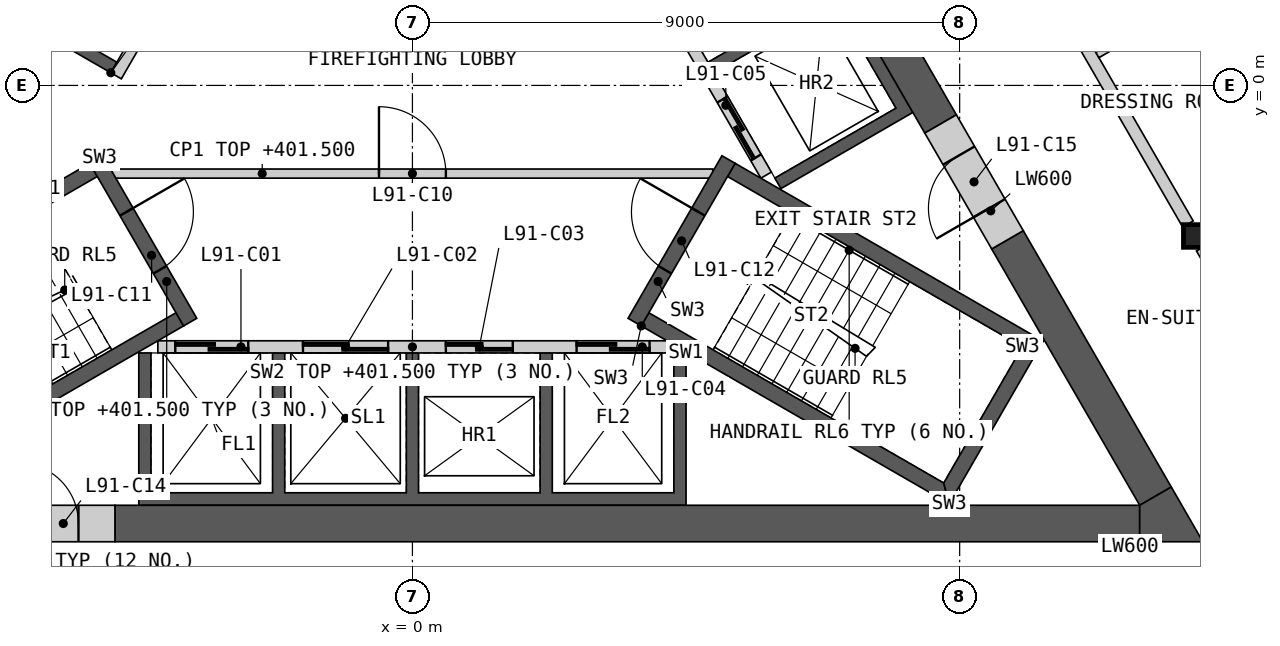
"""IFC4 building model, lengths in metres.
Left out: names, types, materials, properties, quantities, classifications, styles, units other than length and angle.
Written with IfcOpenShell. Run it as: python <this file> out.ifc"""

import sys

from ifc_helpers import new_model, si_unit, direction, frame, frame_2d, origin, origin_2d, place, context, subcontext, project, spatial, polyline, rectangle, i_section, outline, extrude, element, fill, save


model = new_model("IFC4")
c1 = context("Model", 3, precision=1e-05, world=origin(), true_north=direction((0.0, 1.0)))
c2 = subcontext(c1, "Body", "Model", "MODEL_VIEW")
j1 = project(units=[si_unit("LENGTHUNIT", "METRE"), si_unit("PLANEANGLEUNIT", "RADIAN")], contexts=[c1])
p1 = place(None, origin())
s1 = spatial("IfcSite", under=j1, at=p1, CompositionType="ELEMENT")
p2 = place(p1, origin())
s2 = spatial("IfcBuilding", under=s1, at=p2, CompositionType="ELEMENT")
p3 = place(p2, frame((0.0, 0.0, 398.4)))
s3 = spatial("IfcBuildingStorey", under=s2, at=p3, CompositionType="ELEMENT", Elevation=398.4)
p4 = place(p3, frame((12.868, -2.476, 0.0), z_axis=(0.0, 0.0, 1.0), x_axis=(1.0, 0.0, 0.0)))
e1 = element("IfcColumn", 1, at=p4, inside=s3, PredefinedType="COLUMN", context=c2, shape_type="SweptSolid", body=[
    extrude(i_section(OverallWidth=0.374, OverallDepth=0.372, WebThickness=0.016, FlangeThickness=0.026, at=origin_2d()), origin(), (0.0, 0.0, 1.0), 3.4),
])
p5 = place(p3, origin())
e2 = element("IfcWall", 2, at=p5, inside=s3, PredefinedType="SHEAR", context=c2, shape_type="SweptSolid", body=[
    extrude(outline(polyline([(4.5, -4.4), (4.5, -6.906), (-4.5, -6.906), (-4.5, -4.4), (-4.3, -4.4), (-4.3, -6.7), (-2.3, -6.7), (-2.3, -4.4), (-2.1, -4.4), (-2.1, -6.7), (-0.1, -6.7), (-0.1, -4.4), (0.1, -4.4), (0.1, -6.7), (2.1, -6.7), (2.1, -4.4), (2.3, -4.4), (2.3, -6.7), (4.3, -6.7), (4.3, -4.4), (4.5, -4.4)])), origin(), (0.0, 0.0, 1.0), 3.1),
])
p6 = place(p3, frame((-4.187, -4.3, 0.0), z_axis=(0.0, 0.0, 1.0), x_axis=(1.0, 0.0, 0.0)))
e3 = element("IfcWall", 3, at=p6, inside=s3, PredefinedType="SOLIDWALL", context=c2, shape_type="SweptSolid", body=[
    extrude(rectangle(XDim=8.373, YDim=0.2, at=frame_2d((4.187, 0.0))), origin(), (0.0, 0.0, 1.0), 3.1),
])
p7 = place(p6, frame((0.287, 0.0, 0.0)))
e4 = element("IfcOpeningElement", 4, at=p7, cuts=e3, PredefinedType="OPENING", context=c2, shape_type="SweptSolid", body=[
    extrude(rectangle(XDim=1.2, YDim=2.1, at=frame_2d((0.6, 1.05))), frame((0.0, 0.11, 0.0), z_axis=(0.0, -1.0, 0.0), x_axis=(1.0, 0.0, 0.0)), (0.0, 0.0, 1.0), 0.22),
])
p8 = place(p6, frame((2.387, 0.0, 0.0)))
e5 = element("IfcOpeningElement", 5, at=p8, cuts=e3, PredefinedType="OPENING", context=c2, shape_type="SweptSolid", body=[
    extrude(rectangle(XDim=1.4, YDim=2.1, at=frame_2d((0.7, 1.05))), frame((0.0, 0.11, 0.0), z_axis=(0.0, -1.0, 0.0), x_axis=(1.0, 0.0, 0.0)), (0.0, 0.0, 1.0), 0.22),
])
p9 = place(p6, frame((4.737, 0.0, 0.0)))
e6 = element("IfcOpeningElement", 6, at=p9, cuts=e3, PredefinedType="OPENING", context=c2, shape_type="SweptSolid", body=[
    extrude(rectangle(XDim=1.1, YDim=2.1, at=frame_2d((0.55, 1.05))), frame((0.0, 0.11, 0.0), z_axis=(0.0, -1.0, 0.0), x_axis=(1.0, 0.0, 0.0)), (0.0, 0.0, 1.0), 0.22),
])
p10 = place(p6, frame((6.887, 0.0, 0.0)))
e7 = element("IfcOpeningElement", 7, at=p10, cuts=e3, PredefinedType="OPENING", context=c2, shape_type="SweptSolid", body=[
    extrude(rectangle(XDim=1.2, YDim=2.1, at=frame_2d((0.6, 1.05))), frame((0.0, 0.11, 0.0), z_axis=(0.0, -1.0, 0.0), x_axis=(1.0, 0.0, 0.0)), (0.0, 0.0, 1.0), 0.22),
])
p11 = place(p3, origin())
e8 = element("IfcWall", 8, at=p11, inside=s3, PredefinedType="SHEAR", context=c2, shape_type="SweptSolid", body=[
    extrude(outline(polyline([(1.561, 6.097), (3.731, 7.35), (8.231, -0.444), (6.061, -1.697), (5.96, -1.524), (7.952, -0.374), (6.952, 1.358), (4.96, 0.208), (4.861, 0.381), (6.852, 1.531), (5.852, 3.263), (3.861, 2.113), (3.76, 2.287), (5.752, 3.437), (4.752, 5.169), (2.76, 4.019), (2.66, 4.192), (4.652, 5.342), (3.652, 7.074), (1.66, 5.924), (1.561, 6.097)])), origin(), (0.0, 0.0, 1.0), 3.1),
])
p12 = place(p3, frame((5.817, -1.476, 0.0), z_axis=(0.0, 0.0, 1.0), x_axis=(-0.500002616675, 0.866023893041, 0.0)))
e9 = element("IfcWall", 9, at=p12, inside=s3, PredefinedType="SOLIDWALL", context=c2, shape_type="SweptSolid", body=[
    extrude(rectangle(XDim=8.373, YDim=0.2, at=frame_2d((4.187, 0.0))), origin(), (0.0, 0.0, 1.0), 3.1),
])
p13 = place(p12, frame((0.337, 0.0, 0.0)))
e10 = element("IfcOpeningElement", 10, at=p13, cuts=e9, PredefinedType="OPENING", context=c2, shape_type="SweptSolid", body=[
    extrude(rectangle(XDim=1.1, YDim=2.1, at=frame_2d((0.55, 1.05))), frame((0.0, 0.11, 0.0), z_axis=(0.0, -1.0, 0.0), x_axis=(1.0, 0.0, 0.0)), (0.0, 0.0, 1.0), 0.22),
])
p14 = place(p12, frame((2.537, 0.0, 0.0)))
e11 = element("IfcOpeningElement", 11, at=p14, cuts=e9, PredefinedType="OPENING", context=c2, shape_type="SweptSolid", body=[
    extrude(rectangle(XDim=1.1, YDim=2.1, at=frame_2d((0.55, 1.05))), frame((0.0, 0.11, 0.0), z_axis=(0.0, -1.0, 0.0), x_axis=(1.0, 0.0, 0.0)), (0.0, 0.0, 1.0), 0.22),
])
p15 = place(p12, frame((4.737, 0.0, 0.0)))
e12 = element("IfcOpeningElement", 12, at=p15, cuts=e9, PredefinedType="OPENING", context=c2, shape_type="SweptSolid", body=[
    extrude(rectangle(XDim=1.1, YDim=2.1, at=frame_2d((0.55, 1.05))), frame((0.0, 0.11, 0.0), z_axis=(0.0, -1.0, 0.0), x_axis=(1.0, 0.0, 0.0)), (0.0, 0.0, 1.0), 0.22),
])
p16 = place(p12, frame((7.037, 0.0, 0.0)))
e13 = element("IfcOpeningElement", 13, at=p16, cuts=e9, PredefinedType="OPENING", context=c2, shape_type="SweptSolid", body=[
    extrude(rectangle(XDim=0.9, YDim=2.1, at=frame_2d((0.45, 1.05))), frame((0.0, 0.11, 0.0), z_axis=(0.0, -1.0, 0.0), x_axis=(1.0, 0.0, 0.0)), (0.0, 0.0, 1.0), 0.22),
])
p17 = place(p3, origin())
e14 = element("IfcWall", 14, at=p17, inside=s3, PredefinedType="SHEAR", context=c2, shape_type="SweptSolid", body=[
    extrude(outline(polyline([(-4.96, 0.208), (-7.131, 1.461), (-3.731, 7.35), (-1.561, 6.097), (-1.66, 5.924), (-3.652, 7.074), (-6.852, 1.531), (-4.861, 0.381), (-4.96, 0.208)])), origin(), (0.0, 0.0, 1.0), 3.1),
])
p18 = place(p3, frame((-1.631, 5.776, 0.0), z_axis=(0.0, 0.0, 1.0), x_axis=(-0.499992876559, -0.866029516466, 0.0)))
e15 = element("IfcWall", 15, at=p18, inside=s3, PredefinedType="SOLIDWALL", context=c2, shape_type="SweptSolid", body=[
    extrude(rectangle(XDim=6.486, YDim=0.2, at=frame_2d((3.243, 0.0))), origin(), (0.0, 0.0, 1.0), 3.1),
])
p19 = place(p18, frame((2.637, 0.0, 0.0)))
e16 = element("IfcOpeningElement", 16, at=p19, cuts=e15, PredefinedType="OPENING", context=c2, shape_type="SweptSolid", body=[
    extrude(rectangle(XDim=0.9, YDim=2.1, at=frame_2d((0.45, 1.05))), frame((0.0, 0.11, 0.0), z_axis=(0.0, -1.0, 0.0), x_axis=(1.0, 0.0, 0.0)), (0.0, 0.0, 1.0), 0.22),
])
p20 = place(p3, frame((-4.941, -1.45, 0.0), z_axis=(0.0, 0.0, 1.0), x_axis=(1.0, 0.0, 0.0)))
e17 = element("IfcWall", 17, at=p20, inside=s3, PredefinedType="PARTITIONING", context=c2, shape_type="SweptSolid", body=[
    extrude(rectangle(XDim=9.882, YDim=0.15, at=frame_2d((4.941, 0.0))), origin(), (0.0, 0.0, 1.0), 3.1),
])
p21 = place(p20, frame((4.391, 0.0, 0.0)))
e18 = element("IfcOpeningElement", 18, at=p21, cuts=e17, PredefinedType="OPENING", context=c2, shape_type="SweptSolid", body=[
    extrude(rectangle(XDim=1.1, YDim=2.1, at=frame_2d((0.55, 1.05))), frame((0.0, 0.085, 0.0), z_axis=(0.0, -1.0, 0.0), x_axis=(1.0, 0.0, 0.0)), (0.0, 0.0, 1.0), 0.17),
])
p22 = place(p3, origin())
e19 = element("IfcWall", 19, at=p22, inside=s3, PredefinedType="SHEAR", context=c2, shape_type="SweptSolid", body=[
    extrude(outline(polyline([(-5.307, -1.281), (-10.374, -4.206), (-10.032, -4.298), (-5.182, -1.498), (-5.307, -1.281)])), origin(), (0.0, 0.0, 1.0), 3.1),
])
p23 = place(p3, origin())
e20 = element("IfcWall", 20, at=p23, inside=s3, PredefinedType="SHEAR", context=c2, shape_type="SweptSolid", body=[
    extrude(outline(polyline([(-8.738, -6.539), (-8.83, -6.881), (-3.763, -3.956), (-3.888, -3.739), (-8.738, -6.539)])), origin(), (0.0, 0.0, 1.0), 3.1),
])
p24 = place(p3, frame((-5.199, -1.219, 0.0), z_axis=(0.0, 0.0, 1.0), x_axis=(0.499982516597, -0.866035497597, 0.0)))
e21 = element("IfcWall", 21, at=p24, inside=s3, PredefinedType="SHEAR", context=c2, shape_type="SweptSolid", body=[
    extrude(rectangle(XDim=3.088, YDim=0.25, at=frame_2d((1.544, 0.0))), origin(), (0.0, 0.0, 1.0), 3.1),
])
p25 = place(p24, frame((0.994, 0.0, 0.0)))
e22 = element("IfcOpeningElement", 22, at=p25, cuts=e21, PredefinedType="OPENING", context=c2, shape_type="SweptSolid", body=[
    extrude(rectangle(XDim=1.1, YDim=2.1, at=frame_2d((0.55, 1.05))), frame((0.0, 0.135, 0.0), z_axis=(0.0, -1.0, 0.0), x_axis=(1.0, 0.0, 0.0)), (0.0, 0.0, 1.0), 0.27),
])
p26 = place(p3, origin())
e23 = element("IfcWall", 23, at=p26, inside=s3, PredefinedType="SHEAR", context=c2, shape_type="SweptSolid", body=[
    extrude(outline(polyline([(3.763, -3.956), (8.83, -6.881), (8.738, -6.539), (3.888, -3.739), (3.763, -3.956)])), origin(), (0.0, 0.0, 1.0), 3.1),
])
p27 = place(p3, origin())
e24 = element("IfcWall", 24, at=p27, inside=s3, PredefinedType="SHEAR", context=c2, shape_type="SweptSolid", body=[
    extrude(outline(polyline([(8.83, -6.881), (10.374, -4.206), (10.032, -4.298), (8.738, -6.539), (8.83, -6.881)])), origin(), (0.0, 0.0, 1.0), 3.1),
])
p28 = place(p3, origin())
e25 = element("IfcWall", 25, at=p28, inside=s3, PredefinedType="SHEAR", context=c2, shape_type="SweptSolid", body=[
    extrude(outline(polyline([(10.032, -4.298), (10.374, -4.206), (5.307, -1.281), (5.182, -1.498), (10.032, -4.298)])), origin(), (0.0, 0.0, 1.0), 3.1),
])
p29 = place(p3, frame((3.655, -3.893, 0.0), z_axis=(0.0, 0.0, 1.0), x_axis=(0.499982516597, 0.866035497597, 0.0)))
e26 = element("IfcWall", 26, at=p29, inside=s3, PredefinedType="SHEAR", context=c2, shape_type="SweptSolid", body=[
    extrude(rectangle(XDim=3.088, YDim=0.25, at=frame_2d((1.544, 0.0))), origin(), (0.0, 0.0, 1.0), 3.1),
])
p30 = place(p29, frame((0.994, 0.0, 0.0)))
e27 = element("IfcOpeningElement", 27, at=p30, cuts=e26, PredefinedType="OPENING", context=c2, shape_type="SweptSolid", body=[
    extrude(rectangle(XDim=1.1, YDim=2.1, at=frame_2d((0.55, 1.05))), frame((0.0, 0.135, 0.0), z_axis=(0.0, -1.0, 0.0), x_axis=(1.0, 0.0, 0.0)), (0.0, 0.0, 1.0), 0.27),
])
for number, where, z_axis, x_axis in (
    (28, (-4.892, -7.206, 0.0), (0.0, 0.0, 1.0), (1.0, 0.0, 0.0)),
    (29, (8.686, -0.634, 0.0), (0.0, 0.0, 1.0), (-0.5, 0.866, 0.0)),
):
    element("IfcWall", number, at=place(p3, frame(where, z_axis=z_axis, x_axis=x_axis)), inside=s3, PredefinedType="SHEAR", context=c2, shape_type="SweptSolid", body=[
        extrude(rectangle(XDim=16.853, YDim=0.6, at=frame_2d((8.426, 0.0))), origin(), (0.0, 0.0, 1.0), 3.1),
    ])
p31 = place(p3, frame((12.221, -6.756, 0.0), z_axis=(0.0, 0.0, 1.0), x_axis=(-0.50000604952, 0.866021911064, 0.0)))
e30 = element("IfcWall", 30, at=p31, inside=s3, PredefinedType="SHEAR", context=c2, shape_type="SweptSolid", body=[
    extrude(rectangle(XDim=4.869, YDim=0.6, at=frame_2d((2.434, 0.0))), origin(), (0.0, 0.0, 1.0), 3.1),
])
p32 = place(p3, origin())
e31 = element("IfcWall", 31, at=p32, inside=s3, PredefinedType="SHEAR", context=c2, shape_type="SweptSolid", body=[
    extrude(outline(polyline([(11.961, -7.506), (11.961, -6.906), (12.48, -6.606), (13.0, -7.506), (11.961, -7.506)])), origin(), (0.0, 0.0, 1.0), 3.1),
])
p33 = place(p3, frame((-7.092, -7.206, 0.0), z_axis=(0.0, 0.0, 1.0), x_axis=(1.0, 0.0, 0.0)))
e32 = element("IfcWall", 32, at=p33, inside=s3, PredefinedType="SHEAR", context=c2, shape_type="SweptSolid", body=[
    extrude(rectangle(XDim=2.2, YDim=0.6, at=frame_2d((1.1, 0.0))), origin(), (0.0, 0.0, 1.0), 3.1),
])
p34 = place(p33, frame((0.6, 0.0, 0.0)))
e33 = element("IfcOpeningElement", 33, at=p34, cuts=e32, PredefinedType="OPENING", context=c2, shape_type="SweptSolid", body=[
    extrude(rectangle(XDim=1.0, YDim=2.1, at=frame_2d((0.5, 1.05))), frame((0.0, 0.31, 0.0), z_axis=(0.0, -1.0, 0.0), x_axis=(1.0, 0.0, 0.0)), (0.0, 0.0, 1.0), 0.62),
])
p35 = place(p3, frame((9.786, -2.539, 0.0), z_axis=(0.0, 0.0, 1.0), x_axis=(-0.499981787252, 0.866035918664, 0.0)))
e34 = element("IfcWall", 34, at=p35, inside=s3, PredefinedType="SHEAR", context=c2, shape_type="SweptSolid", body=[
    extrude(rectangle(XDim=2.2, YDim=0.6, at=frame_2d((1.1, 0.0))), origin(), (0.0, 0.0, 1.0), 3.1),
])
p36 = place(p35, frame((0.6, 0.0, 0.0)))
e35 = element("IfcOpeningElement", 35, at=p36, cuts=e34, PredefinedType="OPENING", context=c2, shape_type="SweptSolid", body=[
    extrude(rectangle(XDim=1.0, YDim=2.1, at=frame_2d((0.5, 1.05))), frame((0.0, 0.31, 0.0), z_axis=(0.0, -1.0, 0.0), x_axis=(1.0, 0.0, 0.0)), (0.0, 0.0, 1.0), 0.62),
])
p37 = place(p3, frame((8.692, 4.756, 0.0), z_axis=(0.0, 0.0, 1.0), x_axis=(0.500001682468, -0.866024432409, 0.0)))
e36 = element("IfcWall", 36, at=p37, inside=s3, PredefinedType="PARTITIONING", context=c2, shape_type="SweptSolid", body=[
    extrude(rectangle(XDim=8.124, YDim=0.2, at=frame_2d((4.062, 0.0))), origin(), (0.0, 0.0, 1.0), 3.1),
])
p38 = place(p3, frame((12.981, -2.673, 0.0), z_axis=(0.0, 0.0, 1.0), x_axis=(0.499974648164, -0.866040040179, 0.0)))
e37 = element("IfcWall", 37, at=p38, inside=s3, PredefinedType="PARTITIONING", context=c2, shape_type="SweptSolid", body=[
    extrude(rectangle(XDim=4.525, YDim=0.2, at=frame_2d((2.263, 0.0))), origin(), (0.0, 0.0, 1.0), 3.1),
])
p39 = place(p38, frame((2.468, 0.0, 0.0)))
e38 = element("IfcOpeningElement", 38, at=p39, cuts=e37, PredefinedType="OPENING", context=c2, shape_type="SweptSolid", body=[
    extrude(rectangle(XDim=1.0, YDim=2.1, at=frame_2d((0.5, 1.05))), frame((0.0, 0.11, 0.0), z_axis=(0.0, -1.0, 0.0), x_axis=(1.0, 0.0, 0.0)), (0.0, 0.0, 1.0), 0.22),
])
p40 = place(p3, frame((11.265, 0.5, 0.0), z_axis=(0.0, 0.0, 1.0), x_axis=(0.866033839264, 0.499985389037, 0.0)))
e39 = element("IfcWall", 39, at=p40, inside=s3, PredefinedType="PARTITIONING", context=c2, shape_type="SweptSolid", body=[
    extrude(rectangle(XDim=7.1, YDim=0.1, at=frame_2d((3.55, 0.0))), origin(), (0.0, 0.0, 1.0), 2.33),
])
p41 = place(p40, frame((4.992, 0.0, 0.0)))
e40 = element("IfcOpeningElement", 40, at=p41, cuts=e39, PredefinedType="OPENING", context=c2, shape_type="SweptSolid", body=[
    extrude(rectangle(XDim=0.95, YDim=2.1, at=frame_2d((0.475, 1.05))), frame((0.0, 0.06, 0.0), z_axis=(0.0, -1.0, 0.0), x_axis=(1.0, 0.0, 0.0)), (0.0, 0.0, 1.0), 0.12),
])
p42 = place(p7, origin())
e41 = element("IfcDoor", 41, at=p42, inside=s3, OperationType="SLIDING_TO_LEFT", PredefinedType="DOOR", context=c2, shape_type="SweptSolid", body=[
    extrude(rectangle(XDim=1.2, YDim=2.1, at=frame_2d((0.6, 1.05))), frame((0.0, 0.025, 0.0), z_axis=(0.0, -1.0, 0.0), x_axis=(1.0, 0.0, 0.0)), (0.0, 0.0, 1.0), 0.05),
])
fill(e4, e41)
p43 = place(p8, origin())
e42 = element("IfcDoor", 42, at=p43, inside=s3, OperationType="SLIDING_TO_LEFT", PredefinedType="DOOR", context=c2, shape_type="SweptSolid", body=[
    extrude(rectangle(XDim=1.4, YDim=2.1, at=frame_2d((0.7, 1.05))), frame((0.0, 0.025, 0.0), z_axis=(0.0, -1.0, 0.0), x_axis=(1.0, 0.0, 0.0)), (0.0, 0.0, 1.0), 0.05),
])
fill(e5, e42)
p44 = place(p9, origin())
e43 = element("IfcDoor", 43, at=p44, inside=s3, OperationType="SLIDING_TO_LEFT", PredefinedType="DOOR", context=c2, shape_type="SweptSolid", body=[
    extrude(rectangle(XDim=1.1, YDim=2.1, at=frame_2d((0.55, 1.05))), frame((0.0, 0.025, 0.0), z_axis=(0.0, -1.0, 0.0), x_axis=(1.0, 0.0, 0.0)), (0.0, 0.0, 1.0), 0.05),
])
fill(e6, e43)
p45 = place(p10, origin())
e44 = element("IfcDoor", 44, at=p45, inside=s3, OperationType="SLIDING_TO_LEFT", PredefinedType="DOOR", context=c2, shape_type="SweptSolid", body=[
    extrude(rectangle(XDim=1.2, YDim=2.1, at=frame_2d((0.6, 1.05))), frame((0.0, 0.025, 0.0), z_axis=(0.0, -1.0, 0.0), x_axis=(1.0, 0.0, 0.0)), (0.0, 0.0, 1.0), 0.05),
])
fill(e7, e44)
p46 = place(p13, origin())
e45 = element("IfcDoor", 45, at=p46, inside=s3, OperationType="SLIDING_TO_LEFT", PredefinedType="DOOR", context=c2, shape_type="SweptSolid", body=[
    extrude(rectangle(XDim=1.1, YDim=2.1, at=frame_2d((0.55, 1.05))), frame((0.0, 0.025, 0.0), z_axis=(0.0, -1.0, 0.0), x_axis=(1.0, 0.0, 0.0)), (0.0, 0.0, 1.0), 0.05),
])
fill(e10, e45)
p47 = place(p21, origin())
e46 = element("IfcDoor", 46, at=p47, inside=s3, OperationType="SINGLE_SWING_LEFT", PredefinedType="DOOR", context=c2, shape_type="SweptSolid", body=[
    extrude(rectangle(XDim=1.1, YDim=2.1, at=frame_2d((0.55, 1.05))), frame((0.0, 0.025, 0.0), z_axis=(0.0, -1.0, 0.0), x_axis=(1.0, 0.0, 0.0)), (0.0, 0.0, 1.0), 0.05),
])
fill(e18, e46)
p48 = place(p25, origin())
e47 = element("IfcDoor", 47, at=p48, inside=s3, OperationType="SINGLE_SWING_LEFT", PredefinedType="DOOR", context=c2, shape_type="SweptSolid", body=[
    extrude(rectangle(XDim=1.1, YDim=2.1, at=frame_2d((0.55, 1.05))), frame((0.0, 0.025, 0.0), z_axis=(0.0, -1.0, 0.0), x_axis=(1.0, 0.0, 0.0)), (0.0, 0.0, 1.0), 0.05),
])
fill(e22, e47)
p49 = place(p30, origin())
e48 = element("IfcDoor", 48, at=p49, inside=s3, OperationType="SINGLE_SWING_RIGHT", PredefinedType="DOOR", context=c2, shape_type="SweptSolid", body=[
    extrude(rectangle(XDim=1.1, YDim=2.1, at=frame_2d((0.55, 1.05))), frame((0.0, 0.025, 0.0), z_axis=(0.0, -1.0, 0.0), x_axis=(1.0, 0.0, 0.0)), (0.0, 0.0, 1.0), 0.05),
])
fill(e27, e48)
p50 = place(p34, origin())
e49 = element("IfcDoor", 49, at=p50, inside=s3, OperationType="SINGLE_SWING_LEFT", PredefinedType="DOOR", context=c2, shape_type="SweptSolid", body=[
    extrude(rectangle(XDim=1.0, YDim=2.1, at=frame_2d((0.5, 1.05))), frame((0.0, 0.055, 0.0), z_axis=(0.0, -1.0, 0.0), x_axis=(1.0, 0.0, 0.0)), (0.0, 0.0, 1.0), 0.05),
])
fill(e33, e49)
p51 = place(p36, origin())
e50 = element("IfcDoor", 50, at=p51, inside=s3, OperationType="SINGLE_SWING_LEFT", PredefinedType="DOOR", context=c2, shape_type="SweptSolid", body=[
    extrude(rectangle(XDim=1.0, YDim=2.1, at=frame_2d((0.5, 1.05))), frame((0.0, 0.055, 0.0), z_axis=(0.0, -1.0, 0.0), x_axis=(1.0, 0.0, 0.0)), (0.0, 0.0, 1.0), 0.05),
])
fill(e35, e50)
save(model, sys.argv[1])
